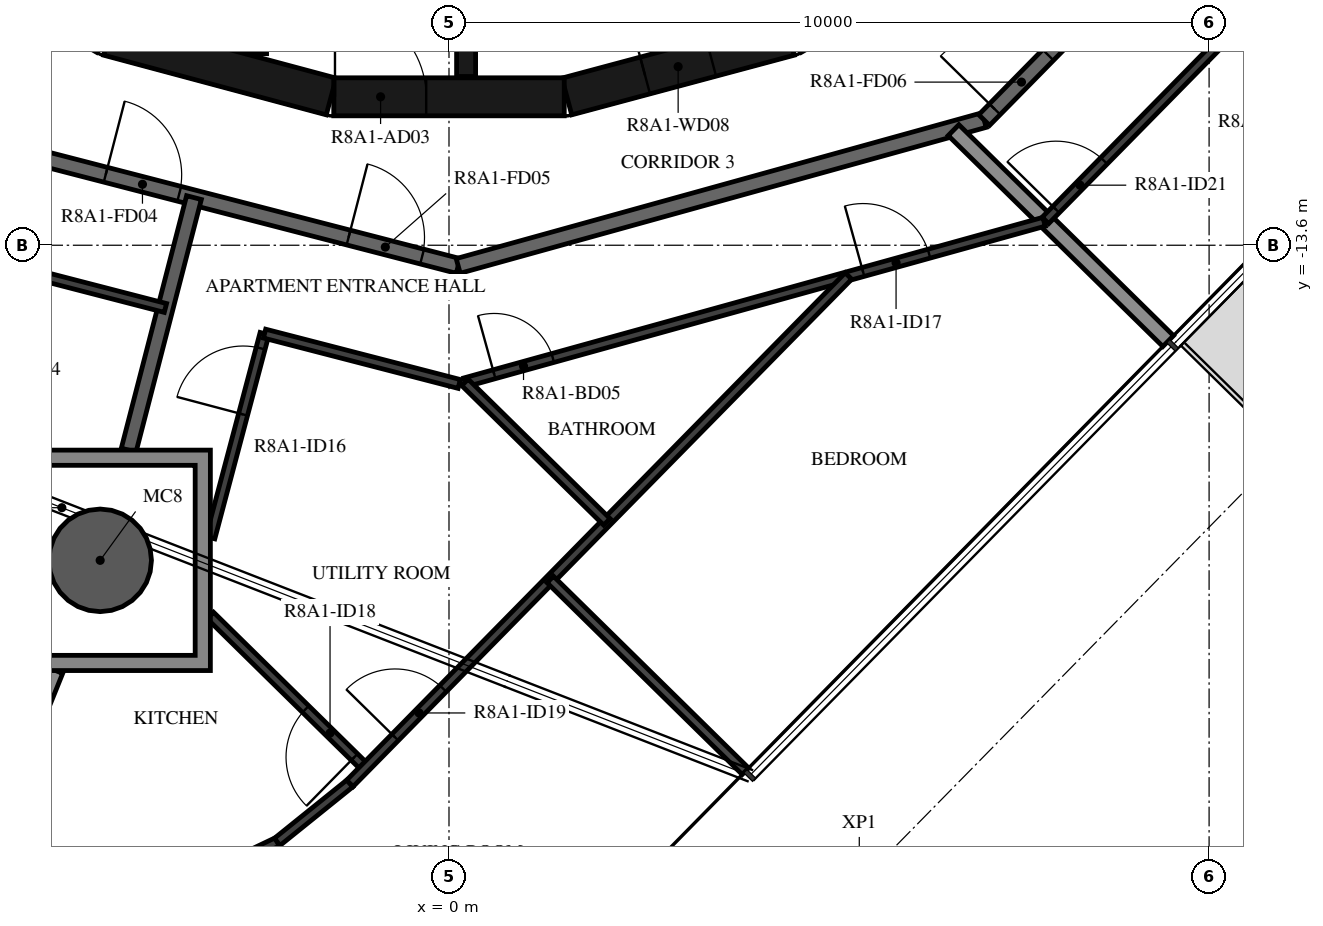
"""IFC4 building model, lengths in metres.
Left out: names, types, materials, properties, quantities, classifications, styles, units other than length and angle.
Written with IfcOpenShell. Run it as: python <this file> out.ifc"""

import sys

from ifc_helpers import new_model, si_unit, direction, frame, frame_2d, origin, origin_2d, place, context, subcontext, project, spatial, polyline, rectangle, hollow_circle, outline, extrude, element, fill, save


model = new_model("IFC4")
c1 = context("Model", 3, precision=1e-05, world=origin(), true_north=direction((0.0, 1.0)))
c2 = subcontext(c1, "Body", "Model", "MODEL_VIEW")
j1 = project(units=[si_unit("LENGTHUNIT", "METRE"), si_unit("PLANEANGLEUNIT", "RADIAN")], contexts=[c1])
p1 = place(None, origin())
s1 = spatial("IfcSite", under=j1, at=p1, CompositionType="ELEMENT")
p2 = place(p1, origin())
s2 = spatial("IfcBuilding", under=s1, at=p2, CompositionType="ELEMENT")
p3 = place(p2, frame((0.0, 0.0, 301.7)))
s3 = spatial("IfcBuildingStorey", under=s2, at=p3, CompositionType="ELEMENT", Elevation=301.7)
p4 = place(p3, frame((-4.589, -17.745, -0.38), z_axis=(0.0, 0.0, 1.0), x_axis=(1.0, 0.0, 0.0)))
e1 = element("IfcColumn", 1, at=p4, inside=s3, PredefinedType="COLUMN", context=c2, shape_type="SweptSolid", body=[
    extrude(hollow_circle(Radius=0.675, WallThickness=0.03, at=origin_2d()), origin(), (0.0, 0.0, 1.0), 3.5),
])
p5 = place(p3, frame((1.55, -11.643, 0.0), z_axis=(0.0, 0.0, 1.0), x_axis=(0.965948410781, 0.258734743916, 0.0)))
e2 = element("IfcWall", 2, at=p5, inside=s3, PredefinedType="SHEAR", context=c2, shape_type="SweptSolid", body=[
    extrude(rectangle(XDim=3.033, YDim=0.5, at=frame_2d((1.516, 0.0))), origin(), (0.0, 0.0, 1.0), 3.12),
])
p6 = place(p5, frame((1.066, 0.0, 0.0)))
e3 = element("IfcOpeningElement", 3, at=p6, cuts=e2, PredefinedType="OPENING", context=c2, shape_type="SweptSolid", body=[
    extrude(rectangle(XDim=0.9, YDim=2.1, at=frame_2d((0.45, 1.05))), frame((0.0, 0.26, 0.0), z_axis=(0.0, -1.0, 0.0), x_axis=(1.0, 0.0, 0.0)), (0.0, 0.0, 1.0), 0.52),
])
p7 = place(p3, frame((-4.479, -10.858, 0.0), z_axis=(0.0, 0.0, 1.0), x_axis=(0.965948410781, -0.258734743916, 0.0)))
e4 = element("IfcWall", 4, at=p7, inside=s3, PredefinedType="SHEAR", context=c2, shape_type="SweptSolid", body=[
    extrude(rectangle(XDim=3.033, YDim=0.5, at=frame_2d((1.516, 0.0))), origin(), (0.0, 0.0, 1.0), 3.12),
])
p8 = place(p3, frame((-1.516, -11.647, 0.0), z_axis=(0.0, 0.0, 1.0), x_axis=(1.0, 0.0, 0.0)))
e5 = element("IfcWall", 5, at=p8, inside=s3, PredefinedType="SHEAR", context=c2, shape_type="SweptSolid", body=[
    extrude(rectangle(XDim=3.033, YDim=0.5, at=frame_2d((1.516, 0.0))), origin(), (0.0, 0.0, 1.0), 3.12),
])
p9 = place(p8, frame((0.016, 0.0, 0.0)))
e6 = element("IfcOpeningElement", 6, at=p9, cuts=e5, PredefinedType="OPENING", context=c2, shape_type="SweptSolid", body=[
    extrude(rectangle(XDim=1.2, YDim=2.1, at=frame_2d((0.6, 1.05))), frame((0.0, 0.26, 0.0), z_axis=(0.0, -1.0, 0.0), x_axis=(1.0, 0.0, 0.0)), (0.0, 0.0, 1.0), 0.52),
])
p10 = place(p3, frame((-2.525, -8.97, 0.0), z_axis=(0.0, 0.0, 1.0), x_axis=(0.0, -1.0, 0.0)))
e7 = element("IfcWall", 7, at=p10, inside=s3, PredefinedType="SHEAR", context=c2, shape_type="SweptSolid", body=[
    extrude(rectangle(XDim=2.11, YDim=0.25, at=frame_2d((1.055, 0.0))), origin(), (0.0, 0.0, 1.0), 3.12),
])
p11 = place(p3, frame((0.225, -8.97, 0.0), z_axis=(0.0, 0.0, 1.0), x_axis=(0.0, -1.0, 0.0)))
e8 = element("IfcWall", 8, at=p11, inside=s3, PredefinedType="SHEAR", context=c2, shape_type="SweptSolid", body=[
    extrude(rectangle(XDim=2.41, YDim=0.25, at=frame_2d((1.205, 0.0))), origin(), (0.0, 0.0, 1.0), 3.12),
])
p12 = place(p3, frame((-6.831, -12.074, 0.0), z_axis=(0.0, 0.0, 1.0), x_axis=(0.968144780225, -0.250391063186, 0.0)))
e9 = element("IfcWall", 9, at=p12, inside=s3, PredefinedType="STANDARD", context=c2, shape_type="SweptSolid", body=[
    extrude(rectangle(XDim=7.181, YDim=0.2, at=frame_2d((3.591, 0.0))), origin(), (0.0, 0.0, 1.0), 3.12),
])
p13 = place(p12, frame((2.39, 0.0, 0.0)))
e10 = element("IfcOpeningElement", 10, at=p13, cuts=e9, PredefinedType="OPENING", context=c2, shape_type="SweptSolid", body=[
    extrude(rectangle(XDim=1.0, YDim=2.1, at=frame_2d((0.5, 1.05))), frame((0.0, 0.11, 0.0), z_axis=(0.0, -1.0, 0.0), x_axis=(1.0, 0.0, 0.0)), (0.0, 0.0, 1.0), 0.22),
])
p14 = place(p12, frame((5.69, 0.0, 0.0)))
e11 = element("IfcOpeningElement", 11, at=p14, cuts=e9, PredefinedType="OPENING", context=c2, shape_type="SweptSolid", body=[
    extrude(rectangle(XDim=1.0, YDim=2.1, at=frame_2d((0.5, 1.05))), frame((0.0, 0.11, 0.0), z_axis=(0.0, -1.0, 0.0), x_axis=(1.0, 0.0, 0.0)), (0.0, 0.0, 1.0), 0.22),
])
p15 = place(p3, frame((0.121, -13.872, 0.0), z_axis=(0.0, 0.0, 1.0), x_axis=(0.963625960674, 0.267254575108, 0.0)))
e12 = element("IfcWall", 12, at=p15, inside=s3, PredefinedType="STANDARD", context=c2, shape_type="SweptSolid", body=[
    extrude(rectangle(XDim=7.181, YDim=0.2, at=frame_2d((3.591, 0.0))), origin(), (0.0, 0.0, 1.0), 3.12),
])
p16 = place(p3, frame((7.041, -11.953, 0.0), z_axis=(0.0, 0.0, 1.0), x_axis=(0.70090916255, 0.713250549143, 0.0)))
e13 = element("IfcWall", 13, at=p16, inside=s3, PredefinedType="STANDARD", context=c2, shape_type="SweptSolid", body=[
    extrude(rectangle(XDim=7.181, YDim=0.2, at=frame_2d((3.59, 0.0))), origin(), (0.0, 0.0, 1.0), 3.12),
])
p17 = place(p16, frame((0.2, 0.0, 0.0)))
e14 = element("IfcOpeningElement", 14, at=p17, cuts=e13, PredefinedType="OPENING", context=c2, shape_type="SweptSolid", body=[
    extrude(rectangle(XDim=1.0, YDim=2.1, at=frame_2d((0.5, 1.05))), frame((0.0, 0.11, 0.0), z_axis=(0.0, -1.0, 0.0), x_axis=(1.0, 0.0, 0.0)), (0.0, 0.0, 1.0), 0.22),
])
p18 = place(p3, frame((-4.214, -16.295, 0.0), z_axis=(0.0, 0.0, 1.0), x_axis=(0.250428810918, 0.968135016752, 0.0)))
e15 = element("IfcWall", 15, at=p18, inside=s3, PredefinedType="STANDARD", context=c2, shape_type="SweptSolid", body=[
    extrude(rectangle(XDim=3.432, YDim=0.2, at=frame_2d((1.716, 0.0))), origin(), (0.0, 0.0, 1.0), 3.12),
])
p19 = place(p3, frame((-7.582, -25.151, 0.0), z_axis=(0.0, 0.0, 1.0), x_axis=(0.374645287615, 0.927168220156, 0.0)))
e16 = element("IfcWall", 16, at=p19, inside=s3, PredefinedType="STANDARD", context=c2, shape_type="SweptSolid", body=[
    extrude(rectangle(XDim=6.423, YDim=0.2, at=frame_2d((3.212, 0.0))), origin(), (0.0, 0.0, 1.0), 2.73),
])
p20 = place(p3, frame((9.462, -14.861, 0.0), z_axis=(0.0, 0.0, 1.0), x_axis=(-0.713276937124, 0.700882308927, 0.0)))
e17 = element("IfcWall", 17, at=p20, inside=s3, PredefinedType="STANDARD", context=c2, shape_type="SweptSolid", body=[
    extrude(rectangle(XDim=3.959, YDim=0.2, at=frame_2d((1.979, 0.0))), origin(), (0.0, 0.0, 1.0), 2.73),
])
p21 = place(p3, frame((-7.596, -13.426, 0.0), z_axis=(0.0, 0.0, 1.0), x_axis=(0.96815406745, -0.250355151095, 0.0)))
e18 = element("IfcWall", 18, at=p21, inside=s3, PredefinedType="PARTITIONING", context=c2, shape_type="SweptSolid", body=[
    extrude(rectangle(XDim=3.992, YDim=0.12, at=frame_2d((1.996, 0.0))), origin(), (0.0, 0.0, 1.0), 3.12),
])
p22 = place(p21, frame((0.2, 0.0, 0.0)))
e19 = element("IfcOpeningElement", 19, at=p22, cuts=e18, PredefinedType="OPENING", context=c2, shape_type="SweptSolid", body=[
    extrude(rectangle(XDim=0.9, YDim=2.1, at=frame_2d((0.45, 1.05))), frame((0.0, 0.07, 0.0), z_axis=(0.0, -1.0, 0.0), x_axis=(1.0, 0.0, 0.0)), (0.0, 0.0, 1.0), 0.14),
])
p23 = place(p3, frame((-3.139, -17.448, 0.0), z_axis=(0.0, 0.0, 1.0), x_axis=(0.256551998295, 0.966530430028, 0.0)))
e20 = element("IfcWall", 20, at=p23, inside=s3, PredefinedType="PARTITIONING", context=c2, shape_type="SweptSolid", body=[
    extrude(rectangle(XDim=2.778, YDim=0.12, at=frame_2d((1.389, 0.0))), origin(), (0.0, 0.0, 1.0), 3.12),
])
p24 = place(p23, frame((1.678, 0.0, 0.0)))
e21 = element("IfcOpeningElement", 21, at=p24, cuts=e20, PredefinedType="OPENING", context=c2, shape_type="SweptSolid", body=[
    extrude(rectangle(XDim=0.9, YDim=2.1, at=frame_2d((0.45, 1.05))), frame((0.0, 0.07, 0.0), z_axis=(0.0, -1.0, 0.0), x_axis=(1.0, 0.0, 0.0)), (0.0, 0.0, 1.0), 0.14),
])
p25 = place(p3, frame((-2.427, -14.763, 0.0), z_axis=(0.0, 0.0, 1.0), x_axis=(0.968151154118, -0.250366417036, 0.0)))
e22 = element("IfcWall", 22, at=p25, inside=s3, PredefinedType="PARTITIONING", context=c2, shape_type="SweptSolid", body=[
    extrude(rectangle(XDim=2.646, YDim=0.12, at=frame_2d((1.323, 0.0))), origin(), (0.0, 0.0, 1.0), 3.12),
])
p26 = place(p3, frame((0.21, -15.404, 0.0), z_axis=(0.0, 0.0, 1.0), x_axis=(0.963630625717, 0.267237754032, 0.0)))
e23 = element("IfcWall", 23, at=p26, inside=s3, PredefinedType="PARTITIONING", context=c2, shape_type="SweptSolid", body=[
    extrude(rectangle(XDim=7.907, YDim=0.12, at=frame_2d((3.954, 0.0))), origin(), (0.0, 0.0, 1.0), 3.12),
])
p27 = place(p26, frame((0.4, 0.0, 0.0)))
e24 = element("IfcOpeningElement", 24, at=p27, cuts=e23, PredefinedType="OPENING", context=c2, shape_type="SweptSolid", body=[
    extrude(rectangle(XDim=0.8, YDim=2.1, at=frame_2d((0.4, 1.05))), frame((0.0, 0.07, 0.0), z_axis=(0.0, -1.0, 0.0), x_axis=(1.0, 0.0, 0.0)), (0.0, 0.0, 1.0), 0.14),
])
p28 = place(p26, frame((5.436, 0.0, 0.0)))
e25 = element("IfcOpeningElement", 25, at=p28, cuts=e23, PredefinedType="OPENING", context=c2, shape_type="SweptSolid", body=[
    extrude(rectangle(XDim=0.9, YDim=2.1, at=frame_2d((0.45, 1.05))), frame((0.0, 0.07, 0.0), z_axis=(0.0, -1.0, 0.0), x_axis=(1.0, 0.0, 0.0)), (0.0, 0.0, 1.0), 0.14),
])
p29 = place(p3, frame((-2.26, -21.449, 0.0), z_axis=(0.0, 0.0, 1.0), x_axis=(-0.90254047062, -0.430605038166, 0.0)))
e26 = element("IfcWall", 26, at=p29, inside=s3, PredefinedType="PARTITIONING", context=c2, shape_type="SweptSolid", body=[
    extrude(rectangle(XDim=1.016, YDim=0.12, at=frame_2d((0.508, 0.0))), origin(), (0.0, 0.0, 1.0), 3.12),
])
p30 = place(p3, frame((-1.101, -20.474, 0.0), z_axis=(0.0, 0.0, 1.0), x_axis=(-0.713316946232, 0.700841589961, 0.0)))
e27 = element("IfcWall", 27, at=p30, inside=s3, PredefinedType="PARTITIONING", context=c2, shape_type="SweptSolid", body=[
    extrude(rectangle(XDim=2.857, YDim=0.12, at=frame_2d((1.429, 0.0))), origin(), (0.0, 0.0, 1.0), 3.12),
])
p31 = place(p30, frame((0.2, 0.0, 0.0)))
e28 = element("IfcOpeningElement", 28, at=p31, cuts=e27, PredefinedType="OPENING", context=c2, shape_type="SweptSolid", body=[
    extrude(rectangle(XDim=0.9, YDim=2.1, at=frame_2d((0.45, 1.05))), frame((0.0, 0.07, 0.0), z_axis=(0.0, -1.0, 0.0), x_axis=(1.0, 0.0, 0.0)), (0.0, 0.0, 1.0), 0.14),
])
p32 = place(p3, frame((-2.26, -21.449, 0.0), z_axis=(0.0, 0.0, 1.0), x_axis=(0.779021167429, 0.626997624156, 0.0)))
e29 = element("IfcWall", 29, at=p32, inside=s3, PredefinedType="PARTITIONING", context=c2, shape_type="SweptSolid", body=[
    extrude(rectangle(XDim=1.227, YDim=0.12, at=frame_2d((0.614, 0.0))), origin(), (0.0, 0.0, 1.0), 3.12),
])
p33 = place(p3, frame((-1.304, -20.68, 0.0), z_axis=(0.0, 0.0, 1.0), x_axis=(0.700896976526, 0.713262524108, 0.0)))
e30 = element("IfcWall", 30, at=p33, inside=s3, PredefinedType="PARTITIONING", context=c2, shape_type="SweptSolid", body=[
    extrude(rectangle(XDim=9.358, YDim=0.12, at=frame_2d((4.679, 0.0))), origin(), (0.0, 0.0, 1.0), 3.12),
])
p34 = place(p33, frame((0.849, 0.0, 0.0)))
e31 = element("IfcOpeningElement", 31, at=p34, cuts=e30, PredefinedType="OPENING", context=c2, shape_type="SweptSolid", body=[
    extrude(rectangle(XDim=0.9, YDim=2.1, at=frame_2d((0.45, 1.05))), frame((0.0, 0.07, 0.0), z_axis=(0.0, -1.0, 0.0), x_axis=(1.0, 0.0, 0.0)), (0.0, 0.0, 1.0), 0.14),
])
p35 = place(p3, frame((2.077, -17.239, 0.0), z_axis=(0.0, 0.0, 1.0), x_axis=(-0.713235001716, 0.700924983381, 0.0)))
e32 = element("IfcWall", 32, at=p35, inside=s3, PredefinedType="PARTITIONING", context=c2, shape_type="SweptSolid", body=[
    extrude(rectangle(XDim=2.618, YDim=0.12, at=frame_2d((1.309, 0.0))), origin(), (0.0, 0.0, 1.0), 3.12),
])
p36 = place(p3, frame((3.9, -20.521, 0.0), z_axis=(0.0, 0.0, 1.0), x_axis=(-0.713217465002, 0.700942827637, 0.0)))
e33 = element("IfcWall", 33, at=p36, inside=s3, PredefinedType="PARTITIONING", context=c2, shape_type="SweptSolid", body=[
    extrude(rectangle(XDim=3.6, YDim=0.12, at=frame_2d((1.8, 0.0))), origin(), (0.0, 0.0, 1.0), 2.73),
])
p37 = place(p3, frame((7.846, -13.273, 0.0), z_axis=(0.0, 0.0, 1.0), x_axis=(0.700911018066, 0.713248725728, 0.0)))
e34 = element("IfcWall", 34, at=p37, inside=s3, PredefinedType="PARTITIONING", context=c2, shape_type="SweptSolid", body=[
    extrude(rectangle(XDim=7.935, YDim=0.12, at=frame_2d((3.968, 0.0))), origin(), (0.0, 0.0, 1.0), 3.12),
])
p38 = place(p37, frame((0.2, 0.0, 0.0)))
e35 = element("IfcOpeningElement", 35, at=p38, cuts=e34, PredefinedType="OPENING", context=c2, shape_type="SweptSolid", body=[
    extrude(rectangle(XDim=0.9, YDim=2.1, at=frame_2d((0.45, 1.05))), frame((0.0, 0.07, 0.0), z_axis=(0.0, -1.0, 0.0), x_axis=(1.0, 0.0, 0.0)), (0.0, 0.0, 1.0), 0.14),
])
p39 = place(p3, origin())
e36 = element("IfcWall", 36, at=p39, inside=s3, PredefinedType="STANDARD", context=c2, shape_type="SweptSolid", body=[
    extrude(outline(polyline([(-3.139, -16.295), (-3.139, -19.195), (-6.039, -19.195), (-6.039, -16.295), (-3.139, -16.295)]), holes=[polyline([(-5.839, -18.995), (-3.339, -18.995), (-3.339, -16.495), (-5.839, -16.495), (-5.839, -18.995)])]), origin(), (0.0, 0.0, 1.0), 3.12),
])
p40 = place(p9, origin())
e37 = element("IfcDoor", 37, at=p40, inside=s3, OperationType="SINGLE_SWING_RIGHT", PredefinedType="DOOR", context=c2, shape_type="SweptSolid", body=[
    extrude(rectangle(XDim=1.2, YDim=2.1, at=frame_2d((0.6, 1.05))), frame((0.0, 0.025, 0.0), z_axis=(0.0, -1.0, 0.0), x_axis=(1.0, 0.0, 0.0)), (0.0, 0.0, 1.0), 0.05),
])
fill(e6, e37)
p41 = place(p6, origin())
e38 = element("IfcDoor", 38, at=p41, inside=s3, OperationType="SINGLE_SWING_RIGHT", PredefinedType="DOOR", context=c2, shape_type="SweptSolid", body=[
    extrude(rectangle(XDim=0.9, YDim=2.1, at=frame_2d((0.45, 1.05))), frame((0.0, 0.025, 0.0), z_axis=(0.0, -1.0, 0.0), x_axis=(1.0, 0.0, 0.0)), (0.0, 0.0, 1.0), 0.05),
])
fill(e3, e38)
p42 = place(p13, origin())
e39 = element("IfcDoor", 39, at=p42, inside=s3, OperationType="SINGLE_SWING_RIGHT", PredefinedType="DOOR", context=c2, shape_type="SweptSolid", body=[
    extrude(rectangle(XDim=1.0, YDim=2.1, at=frame_2d((0.5, 1.05))), frame((0.0, 0.025, 0.0), z_axis=(0.0, -1.0, 0.0), x_axis=(1.0, 0.0, 0.0)), (0.0, 0.0, 1.0), 0.05),
])
fill(e10, e39)
p43 = place(p14, origin())
e40 = element("IfcDoor", 40, at=p43, inside=s3, OperationType="SINGLE_SWING_LEFT", PredefinedType="DOOR", context=c2, shape_type="SweptSolid", body=[
    extrude(rectangle(XDim=1.0, YDim=2.1, at=frame_2d((0.5, 1.05))), frame((0.0, 0.025, 0.0), z_axis=(0.0, -1.0, 0.0), x_axis=(1.0, 0.0, 0.0)), (0.0, 0.0, 1.0), 0.05),
])
fill(e11, e40)
p44 = place(p24, origin())
e41 = element("IfcDoor", 41, at=p44, inside=s3, OperationType="SINGLE_SWING_LEFT", PredefinedType="DOOR", context=c2, shape_type="SweptSolid", body=[
    extrude(rectangle(XDim=0.9, YDim=2.1, at=frame_2d((0.45, 1.05))), frame((0.0, 0.025, 0.0), z_axis=(0.0, -1.0, 0.0), x_axis=(1.0, 0.0, 0.0)), (0.0, 0.0, 1.0), 0.05),
])
fill(e21, e41)
p45 = place(p27, origin())
e42 = element("IfcDoor", 42, at=p45, inside=s3, OperationType="SINGLE_SWING_LEFT", PredefinedType="DOOR", context=c2, shape_type="SweptSolid", body=[
    extrude(rectangle(XDim=0.8, YDim=2.1, at=frame_2d((0.4, 1.05))), frame((0.0, 0.025, 0.0), z_axis=(0.0, -1.0, 0.0), x_axis=(1.0, 0.0, 0.0)), (0.0, 0.0, 1.0), 0.05),
])
fill(e24, e42)
p46 = place(p28, origin())
e43 = element("IfcDoor", 43, at=p46, inside=s3, OperationType="SINGLE_SWING_LEFT", PredefinedType="DOOR", context=c2, shape_type="SweptSolid", body=[
    extrude(rectangle(XDim=0.9, YDim=2.1, at=frame_2d((0.45, 1.05))), frame((0.0, 0.025, 0.0), z_axis=(0.0, -1.0, 0.0), x_axis=(1.0, 0.0, 0.0)), (0.0, 0.0, 1.0), 0.05),
])
fill(e25, e43)
p47 = place(p31, origin())
e44 = element("IfcDoor", 44, at=p47, inside=s3, OperationType="SINGLE_SWING_LEFT", PredefinedType="DOOR", context=c2, shape_type="SweptSolid", body=[
    extrude(rectangle(XDim=0.9, YDim=2.1, at=frame_2d((0.45, 1.05))), frame((0.0, 0.025, 0.0), z_axis=(0.0, -1.0, 0.0), x_axis=(1.0, 0.0, 0.0)), (0.0, 0.0, 1.0), 0.05),
])
fill(e28, e44)
p48 = place(p34, origin())
e45 = element("IfcDoor", 45, at=p48, inside=s3, OperationType="SINGLE_SWING_LEFT", PredefinedType="DOOR", context=c2, shape_type="SweptSolid", body=[
    extrude(rectangle(XDim=0.9, YDim=2.1, at=frame_2d((0.45, 1.05))), frame((0.0, 0.025, 0.0), z_axis=(0.0, -1.0, 0.0), x_axis=(1.0, 0.0, 0.0)), (0.0, 0.0, 1.0), 0.05),
])
fill(e31, e45)
p49 = place(p17, origin())
e46 = element("IfcDoor", 46, at=p49, inside=s3, OperationType="SINGLE_SWING_LEFT", PredefinedType="DOOR", context=c2, shape_type="SweptSolid", body=[
    extrude(rectangle(XDim=1.0, YDim=2.1, at=frame_2d((0.5, 1.05))), frame((0.0, 0.025, 0.0), z_axis=(0.0, -1.0, 0.0), x_axis=(1.0, 0.0, 0.0)), (0.0, 0.0, 1.0), 0.05),
])
fill(e14, e46)
p50 = place(p38, origin())
e47 = element("IfcDoor", 47, at=p50, inside=s3, OperationType="SINGLE_SWING_LEFT", PredefinedType="DOOR", context=c2, shape_type="SweptSolid", body=[
    extrude(rectangle(XDim=0.9, YDim=2.1, at=frame_2d((0.45, 1.05))), frame((0.0, 0.025, 0.0), z_axis=(0.0, -1.0, 0.0), x_axis=(1.0, 0.0, 0.0)), (0.0, 0.0, 1.0), 0.05),
])
fill(e35, e47)
save(model, sys.argv[1])
